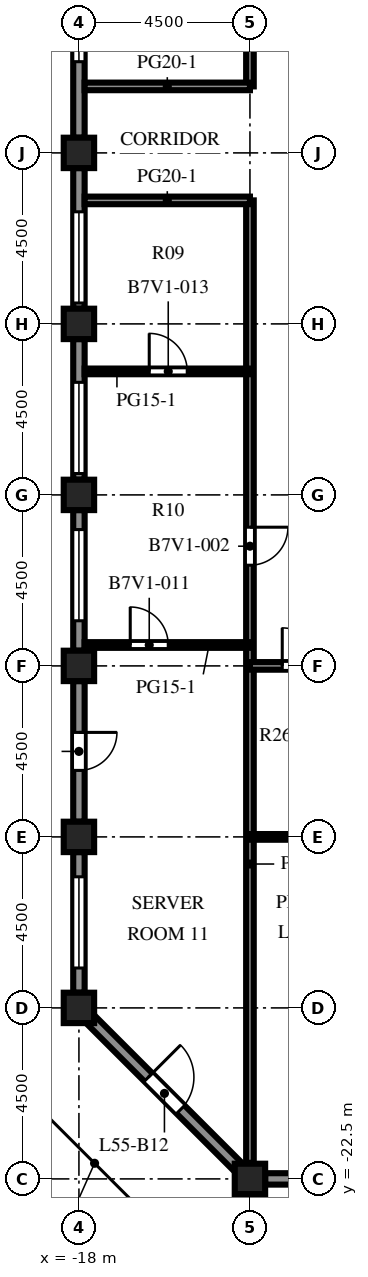
"""IFC4 building model, lengths in metres.
Left out: names, types, materials, properties, quantities, classifications, styles, units other than length and angle.
Written with IfcOpenShell. Run it as: python <this file> out.ifc"""

import sys

from ifc_helpers import new_model, si_unit, direction, frame, frame_2d, origin, origin_2d, place, context, subcontext, project, spatial, rectangle, extrude, element, fill, save


model = new_model("IFC4")
c1 = context("Model", 3, precision=1e-05, world=origin(), true_north=direction((0.0, 1.0)))
c2 = subcontext(c1, "Body", "Model", "MODEL_VIEW")
j1 = project(units=[si_unit("LENGTHUNIT", "METRE"), si_unit("PLANEANGLEUNIT", "RADIAN")], contexts=[c1])
p1 = place(None, origin())
s1 = spatial("IfcSite", under=j1, at=p1, CompositionType="ELEMENT")
p2 = place(p1, origin())
s2 = spatial("IfcBuilding", under=s1, at=p2, CompositionType="ELEMENT")
p3 = place(p2, frame((0.0, 0.0, 243.9)))
s3 = spatial("IfcBuildingStorey", under=s2, at=p3, CompositionType="ELEMENT", Elevation=243.9)
for number, where, z_axis, x_axis in (
    (1, (-18.0, -18.0, 0.0), (0.0, 0.0, 1.0), (1.0, 0.0, 0.0)),
    (2, (-18.0, -13.5, 0.0), (0.0, 0.0, 1.0), (1.0, 0.0, 0.0)),
    (3, (-18.0, -9.0, 0.0), (0.0, 0.0, 1.0), (1.0, 0.0, 0.0)),
    (4, (-18.0, -4.5, 0.0), (0.0, 0.0, 1.0), (1.0, 0.0, 0.0)),
    (5, (-18.0, 0.0, 0.0), (0.0, 0.0, 1.0), (1.0, 0.0, 0.0)),
    (6, (-18.0, 4.5, 0.0), (0.0, 0.0, 1.0), (1.0, 0.0, 0.0)),
    (7, (-13.5, -22.5, 0.0), (0.0, 0.0, 1.0), (1.0, 0.0, 0.0)),
):
    element("IfcColumn", number, at=place(p3, frame(where, z_axis=z_axis, x_axis=x_axis)), inside=s3, PredefinedType="COLUMN", context=c2, shape_type="SweptSolid", body=[
        extrude(rectangle(XDim=0.8, YDim=0.8, at=origin_2d()), origin(), (0.0, 0.0, 1.0), 4.1),
    ])
p4 = place(p3, frame((-9.4, -22.5, 0.0), z_axis=(0.0, 0.0, 1.0), x_axis=(-1.0, 0.0, 0.0)))
e8 = element("IfcWall", 8, at=p4, inside=s3, PredefinedType="SOLIDWALL", context=c2, shape_type="SweptSolid", body=[
    extrude(rectangle(XDim=3.7, YDim=0.3, at=frame_2d((1.85, 0.0))), origin(), (0.0, 0.0, 1.0), 2.85),
])
p5 = place(p4, frame((0.65, 0.0, 0.8)))
e9 = element("IfcOpeningElement", 9, at=p5, cuts=e8, PredefinedType="OPENING", context=c2, shape_type="SweptSolid", body=[
    extrude(rectangle(XDim=2.4, YDim=1.7, at=frame_2d((1.2, 0.85))), frame((0.0, 0.16, 0.0), z_axis=(0.0, -1.0, 0.0), x_axis=(1.0, 0.0, 0.0)), (0.0, 0.0, 1.0), 0.32),
])
p6 = place(p3, frame((-18.0, 4.9, 0.0), z_axis=(0.0, 0.0, 1.0), x_axis=(0.0, 1.0, 0.0)))
e10 = element("IfcWall", 10, at=p6, inside=s3, PredefinedType="SOLIDWALL", context=c2, shape_type="SweptSolid", body=[
    extrude(rectangle(XDim=3.7, YDim=0.3, at=frame_2d((1.85, 0.0))), origin(), (0.0, 0.0, 1.0), 2.85),
])
p7 = place(p6, frame((2.0, 0.0, 0.8)))
e11 = element("IfcOpeningElement", 11, at=p7, cuts=e10, PredefinedType="OPENING", context=c2, shape_type="SweptSolid", body=[
    extrude(rectangle(XDim=1.2, YDim=1.7, at=frame_2d((0.6, 0.85))), frame((0.0, 0.16, 0.0), z_axis=(0.0, -1.0, 0.0), x_axis=(1.0, 0.0, 0.0)), (0.0, 0.0, 1.0), 0.32),
])
p8 = place(p3, frame((-18.0, 0.4, 0.0), z_axis=(0.0, 0.0, 1.0), x_axis=(0.0, 1.0, 0.0)))
e12 = element("IfcWall", 12, at=p8, inside=s3, PredefinedType="SOLIDWALL", context=c2, shape_type="SweptSolid", body=[
    extrude(rectangle(XDim=3.7, YDim=0.3, at=frame_2d((1.85, 0.0))), origin(), (0.0, 0.0, 1.0), 2.85),
])
p9 = place(p8, frame((0.15, 0.0, 0.8)))
e13 = element("IfcOpeningElement", 13, at=p9, cuts=e12, PredefinedType="OPENING", context=c2, shape_type="SweptSolid", body=[
    extrude(rectangle(XDim=2.4, YDim=1.7, at=frame_2d((1.2, 0.85))), frame((0.0, 0.16, 0.0), z_axis=(0.0, -1.0, 0.0), x_axis=(1.0, 0.0, 0.0)), (0.0, 0.0, 1.0), 0.32),
])
p10 = place(p3, frame((-18.0, -4.1, 0.0), z_axis=(0.0, 0.0, 1.0), x_axis=(0.0, 1.0, 0.0)))
e14 = element("IfcWall", 14, at=p10, inside=s3, PredefinedType="SOLIDWALL", context=c2, shape_type="SweptSolid", body=[
    extrude(rectangle(XDim=3.7, YDim=0.3, at=frame_2d((1.85, 0.0))), origin(), (0.0, 0.0, 1.0), 2.85),
])
p11 = place(p10, frame((0.163, 0.0, 0.8)))
e15 = element("IfcOpeningElement", 15, at=p11, cuts=e14, PredefinedType="OPENING", context=c2, shape_type="SweptSolid", body=[
    extrude(rectangle(XDim=2.4, YDim=1.7, at=frame_2d((1.2, 0.85))), frame((0.0, 0.16, 0.0), z_axis=(0.0, -1.0, 0.0), x_axis=(1.0, 0.0, 0.0)), (0.0, 0.0, 1.0), 0.32),
])
p12 = place(p3, frame((-18.0, -8.6, 0.0), z_axis=(0.0, 0.0, 1.0), x_axis=(0.0, 1.0, 0.0)))
e16 = element("IfcWall", 16, at=p12, inside=s3, PredefinedType="SOLIDWALL", context=c2, shape_type="SweptSolid", body=[
    extrude(rectangle(XDim=3.7, YDim=0.3, at=frame_2d((1.85, 0.0))), origin(), (0.0, 0.0, 1.0), 2.85),
])
p13 = place(p12, frame((0.788, 0.0, 0.8)))
e17 = element("IfcOpeningElement", 17, at=p13, cuts=e16, PredefinedType="OPENING", context=c2, shape_type="SweptSolid", body=[
    extrude(rectangle(XDim=2.4, YDim=1.7, at=frame_2d((1.2, 0.85))), frame((0.0, 0.16, 0.0), z_axis=(0.0, -1.0, 0.0), x_axis=(1.0, 0.0, 0.0)), (0.0, 0.0, 1.0), 0.32),
])
p14 = place(p3, frame((-18.0, -13.1, 0.0), z_axis=(0.0, 0.0, 1.0), x_axis=(0.0, 1.0, 0.0)))
e18 = element("IfcWall", 18, at=p14, inside=s3, PredefinedType="SOLIDWALL", context=c2, shape_type="SweptSolid", body=[
    extrude(rectangle(XDim=3.7, YDim=0.3, at=frame_2d((1.85, 0.0))), origin(), (0.0, 0.0, 1.0), 2.85),
])
p15 = place(p14, frame((1.35, 0.0, 0.0)))
e19 = element("IfcOpeningElement", 19, at=p15, cuts=e18, PredefinedType="OPENING", context=c2, shape_type="SweptSolid", body=[
    extrude(rectangle(XDim=1.0, YDim=2.2, at=frame_2d((0.5, 1.1))), frame((0.0, 0.16, 0.0), z_axis=(0.0, -1.0, 0.0), x_axis=(1.0, 0.0, 0.0)), (0.0, 0.0, 1.0), 0.32),
])
p16 = place(p3, frame((-18.0, -17.6, 0.0), z_axis=(0.0, 0.0, 1.0), x_axis=(0.0, 1.0, 0.0)))
e20 = element("IfcWall", 20, at=p16, inside=s3, PredefinedType="SOLIDWALL", context=c2, shape_type="SweptSolid", body=[
    extrude(rectangle(XDim=3.7, YDim=0.3, at=frame_2d((1.85, 0.0))), origin(), (0.0, 0.0, 1.0), 2.85),
])
p17 = place(p16, frame((0.65, 0.0, 0.8)))
e21 = element("IfcOpeningElement", 21, at=p17, cuts=e20, PredefinedType="OPENING", context=c2, shape_type="SweptSolid", body=[
    extrude(rectangle(XDim=2.4, YDim=1.7, at=frame_2d((1.2, 0.85))), frame((0.0, 0.16, 0.0), z_axis=(0.0, -1.0, 0.0), x_axis=(1.0, 0.0, 0.0)), (0.0, 0.0, 1.0), 0.32),
])
p18 = place(p3, frame((-13.794, -22.206, 0.0), z_axis=(0.0, 0.0, 1.0), x_axis=(-0.707106781187, 0.707106781187, 0.0)))
e22 = element("IfcWall", 22, at=p18, inside=s3, PredefinedType="SOLIDWALL", context=c2, shape_type="SweptSolid", body=[
    extrude(rectangle(XDim=5.532, YDim=0.3, at=frame_2d((2.766, 0.0))), origin(), (0.0, 0.0, 1.0), 2.85),
])
p19 = place(p18, frame((2.166, 0.0, 0.0)))
e23 = element("IfcOpeningElement", 23, at=p19, cuts=e22, PredefinedType="OPENING", context=c2, shape_type="SweptSolid", body=[
    extrude(rectangle(XDim=1.2, YDim=2.2, at=frame_2d((0.6, 1.1))), frame((0.0, 0.16, 0.0), z_axis=(0.0, -1.0, 0.0), x_axis=(1.0, 0.0, 0.0)), (0.0, 0.0, 1.0), 0.32),
])
p20 = place(p3, frame((-13.5, -22.077, 0.0), z_axis=(0.0, 0.0, 1.0), x_axis=(0.0, 1.0, 0.0)))
e24 = element("IfcWall", 24, at=p20, inside=s3, PredefinedType="PARTITIONING", context=c2, shape_type="SweptSolid", body=[
    extrude(rectangle(XDim=25.327, YDim=0.2, at=frame_2d((12.664, 0.0))), origin(), (0.0, 0.0, 1.0), 3.65),
])
p21 = place(p20, frame((15.727, 0.0, 0.0)))
e25 = element("IfcOpeningElement", 25, at=p21, cuts=e24, PredefinedType="OPENING", context=c2, shape_type="SweptSolid", body=[
    extrude(rectangle(XDim=1.0, YDim=2.1, at=frame_2d((0.5, 1.05))), frame((0.0, 0.11, 0.0), z_axis=(0.0, -1.0, 0.0), x_axis=(1.0, 0.0, 0.0)), (0.0, 0.0, 1.0), 0.22),
])
p22 = place(p3, frame((-13.5, 6.25, 0.0), z_axis=(0.0, 0.0, 1.0), x_axis=(0.0, 1.0, 0.0)))
e26 = element("IfcWall", 26, at=p22, inside=s3, PredefinedType="PARTITIONING", context=c2, shape_type="SweptSolid", body=[
    extrude(rectangle(XDim=24.827, YDim=0.2, at=frame_2d((12.414, 0.0))), origin(), (0.0, 0.0, 1.0), 3.65),
])
p23 = place(p22, frame((8.35, 0.0, 0.0)))
e27 = element("IfcOpeningElement", 27, at=p23, cuts=e26, PredefinedType="OPENING", context=c2, shape_type="SweptSolid", body=[
    extrude(rectangle(XDim=1.0, YDim=2.1, at=frame_2d((0.5, 1.05))), frame((0.0, 0.11, 0.0), z_axis=(0.0, -1.0, 0.0), x_axis=(1.0, 0.0, 0.0)), (0.0, 0.0, 1.0), 0.22),
])
p24 = place(p3, frame((21.0, -13.5, 0.0), z_axis=(0.0, 0.0, 1.0), x_axis=(-1.0, 0.0, 0.0)))
e28 = element("IfcWall", 28, at=p24, inside=s3, PredefinedType="PARTITIONING", context=c2, shape_type="SweptSolid", body=[
    extrude(rectangle(XDim=34.5, YDim=0.15, at=frame_2d((17.25, 0.0))), origin(), (0.0, 0.0, 1.0), 3.65),
])
p25 = place(p24, frame((31.65, 0.0, 0.0)))
e29 = element("IfcOpeningElement", 29, at=p25, cuts=e28, PredefinedType="OPENING", context=c2, shape_type="SweptSolid", body=[
    extrude(rectangle(XDim=1.0, YDim=2.1, at=frame_2d((0.5, 1.05))), frame((0.0, 0.085, 0.0), z_axis=(0.0, -1.0, 0.0), x_axis=(1.0, 0.0, 0.0)), (0.0, 0.0, 1.0), 0.17),
])
p26 = place(p24, frame((22.15, 0.0, 0.0)))
e30 = element("IfcOpeningElement", 30, at=p26, cuts=e28, PredefinedType="OPENING", context=c2, shape_type="SweptSolid", body=[
    extrude(rectangle(XDim=1.0, YDim=2.1, at=frame_2d((0.5, 1.05))), frame((0.0, 0.085, 0.0), z_axis=(0.0, -1.0, 0.0), x_axis=(1.0, 0.0, 0.0)), (0.0, 0.0, 1.0), 0.17),
])
p27 = place(p24, frame((13.15, 0.0, 0.0)))
e31 = element("IfcOpeningElement", 31, at=p27, cuts=e28, PredefinedType="OPENING", context=c2, shape_type="SweptSolid", body=[
    extrude(rectangle(XDim=1.0, YDim=2.1, at=frame_2d((0.5, 1.05))), frame((0.0, 0.085, 0.0), z_axis=(0.0, -1.0, 0.0), x_axis=(1.0, 0.0, 0.0)), (0.0, 0.0, 1.0), 0.17),
])
p28 = place(p24, frame((6.15, 0.0, 0.0)))
e32 = element("IfcOpeningElement", 32, at=p28, cuts=e28, PredefinedType="OPENING", context=c2, shape_type="SweptSolid", body=[
    extrude(rectangle(XDim=1.0, YDim=2.1, at=frame_2d((0.5, 1.05))), frame((0.0, 0.085, 0.0), z_axis=(0.0, -1.0, 0.0), x_axis=(1.0, 0.0, 0.0)), (0.0, 0.0, 1.0), 0.17),
])
p29 = place(p3, frame((-10.5, -9.0, 0.0), z_axis=(0.0, 0.0, 1.0), x_axis=(-1.0, 0.0, 0.0)))
e33 = element("IfcWall", 33, at=p29, inside=s3, PredefinedType="PARTITIONING", context=c2, shape_type="SweptSolid", body=[
    extrude(rectangle(XDim=3.0, YDim=0.2, at=frame_2d((1.5, 0.0))), origin(), (0.0, 0.0, 1.0), 3.65),
])
p30 = place(p29, frame((1.15, 0.0, 0.0)))
e34 = element("IfcOpeningElement", 34, at=p30, cuts=e33, PredefinedType="OPENING", context=c2, shape_type="SweptSolid", body=[
    extrude(rectangle(XDim=1.0, YDim=2.1, at=frame_2d((0.5, 1.05))), frame((0.0, 0.11, 0.0), z_axis=(0.0, -1.0, 0.0), x_axis=(1.0, 0.0, 0.0)), (0.0, 0.0, 1.0), 0.22),
])
p31 = place(p3, frame((-13.5, -8.45, 0.0), z_axis=(0.0, 0.0, 1.0), x_axis=(-1.0, 0.0, 0.0)))
e35 = element("IfcWall", 35, at=p31, inside=s3, PredefinedType="PARTITIONING", context=c2, shape_type="SweptSolid", body=[
    extrude(rectangle(XDim=4.35, YDim=0.15, at=frame_2d((2.175, 0.0))), origin(), (0.0, 0.0, 1.0), 3.65),
])
p32 = place(p31, frame((2.15, 0.0, 0.0)))
e36 = element("IfcOpeningElement", 36, at=p32, cuts=e35, PredefinedType="OPENING", context=c2, shape_type="SweptSolid", body=[
    extrude(rectangle(XDim=1.0, YDim=2.1, at=frame_2d((0.5, 1.05))), frame((0.0, 0.085, 0.0), z_axis=(0.0, -1.0, 0.0), x_axis=(1.0, 0.0, 0.0)), (0.0, 0.0, 1.0), 0.17),
])
p33 = place(p3, frame((-17.85, -1.25, 0.0), z_axis=(0.0, 0.0, 1.0), x_axis=(1.0, 0.0, 0.0)))
e37 = element("IfcWall", 37, at=p33, inside=s3, PredefinedType="PARTITIONING", context=c2, shape_type="SweptSolid", body=[
    extrude(rectangle(XDim=4.35, YDim=0.15, at=frame_2d((2.175, 0.0))), origin(), (0.0, 0.0, 1.0), 3.65),
])
p34 = place(p33, frame((1.7, 0.0, 0.0)))
e38 = element("IfcOpeningElement", 38, at=p34, cuts=e37, PredefinedType="OPENING", context=c2, shape_type="SweptSolid", body=[
    extrude(rectangle(XDim=1.0, YDim=2.1, at=frame_2d((0.5, 1.05))), frame((0.0, 0.085, 0.0), z_axis=(0.0, -1.0, 0.0), x_axis=(1.0, 0.0, 0.0)), (0.0, 0.0, 1.0), 0.17),
])
for number, where, z_axis, x_axis in (
    (39, (-17.85, 3.25, 0.0), (0.0, 0.0, 1.0), (1.0, 0.0, 0.0)),
    (40, (-17.85, 6.25, 0.0), (0.0, 0.0, 1.0), (1.0, 0.0, 0.0)),
):
    element("IfcWall", number, at=place(p3, frame(where, z_axis=z_axis, x_axis=x_axis)), inside=s3, PredefinedType="PARTITIONING", context=c2, shape_type="SweptSolid", body=[
        extrude(rectangle(XDim=4.35, YDim=0.2, at=frame_2d((2.175, 0.0))), origin(), (0.0, 0.0, 1.0), 3.65),
    ])
p35 = place(p7, origin())
e41 = element("IfcWindow", 41, at=p35, inside=s3, PartitioningType="SINGLE_PANEL", PredefinedType="WINDOW", context=c2, shape_type="SweptSolid", body=[
    extrude(rectangle(XDim=1.2, YDim=1.7, at=frame_2d((0.6, 0.85))), frame((0.0, 0.03, 0.0), z_axis=(0.0, -1.0, 0.0), x_axis=(1.0, 0.0, 0.0)), (0.0, 0.0, 1.0), 0.06),
])
fill(e11, e41)
p36 = place(p9, origin())
e42 = element("IfcWindow", 42, at=p36, inside=s3, PartitioningType="SINGLE_PANEL", PredefinedType="WINDOW", context=c2, shape_type="SweptSolid", body=[
    extrude(rectangle(XDim=2.4, YDim=1.7, at=frame_2d((1.2, 0.85))), frame((0.0, 0.03, 0.0), z_axis=(0.0, -1.0, 0.0), x_axis=(1.0, 0.0, 0.0)), (0.0, 0.0, 1.0), 0.06),
])
fill(e13, e42)
p37 = place(p11, origin())
e43 = element("IfcWindow", 43, at=p37, inside=s3, PartitioningType="SINGLE_PANEL", PredefinedType="WINDOW", context=c2, shape_type="SweptSolid", body=[
    extrude(rectangle(XDim=2.4, YDim=1.7, at=frame_2d((1.2, 0.85))), frame((0.0, 0.03, 0.0), z_axis=(0.0, -1.0, 0.0), x_axis=(1.0, 0.0, 0.0)), (0.0, 0.0, 1.0), 0.06),
])
fill(e15, e43)
p38 = place(p13, origin())
e44 = element("IfcWindow", 44, at=p38, inside=s3, PartitioningType="SINGLE_PANEL", PredefinedType="WINDOW", context=c2, shape_type="SweptSolid", body=[
    extrude(rectangle(XDim=2.4, YDim=1.7, at=frame_2d((1.2, 0.85))), frame((0.0, 0.03, 0.0), z_axis=(0.0, -1.0, 0.0), x_axis=(1.0, 0.0, 0.0)), (0.0, 0.0, 1.0), 0.06),
])
fill(e17, e44)
p39 = place(p15, origin())
e45 = element("IfcDoor", 45, at=p39, inside=s3, OperationType="SINGLE_SWING_RIGHT", PredefinedType="DOOR", context=c2, shape_type="SweptSolid", body=[
    extrude(rectangle(XDim=1.0, YDim=2.2, at=frame_2d((0.5, 1.1))), frame((0.0, 0.025, 0.0), z_axis=(0.0, -1.0, 0.0), x_axis=(1.0, 0.0, 0.0)), (0.0, 0.0, 1.0), 0.05),
])
fill(e19, e45)
p40 = place(p17, origin())
e46 = element("IfcWindow", 46, at=p40, inside=s3, PartitioningType="SINGLE_PANEL", PredefinedType="WINDOW", context=c2, shape_type="SweptSolid", body=[
    extrude(rectangle(XDim=2.4, YDim=1.7, at=frame_2d((1.2, 0.85))), frame((0.0, 0.03, 0.0), z_axis=(0.0, -1.0, 0.0), x_axis=(1.0, 0.0, 0.0)), (0.0, 0.0, 1.0), 0.06),
])
fill(e21, e46)
p41 = place(p19, origin())
e47 = element("IfcDoor", 47, at=p41, inside=s3, OperationType="SINGLE_SWING_RIGHT", PredefinedType="DOOR", context=c2, shape_type="SweptSolid", body=[
    extrude(rectangle(XDim=1.2, YDim=2.2, at=frame_2d((0.6, 1.1))), frame((0.0, 0.025, 0.0), z_axis=(0.0, -1.0, 0.0), x_axis=(1.0, 0.0, 0.0)), (0.0, 0.0, 1.0), 0.05),
])
fill(e23, e47)
p42 = place(p21, origin())
e48 = element("IfcDoor", 48, at=p42, inside=s3, OperationType="SINGLE_SWING_RIGHT", PredefinedType="DOOR", context=c2, shape_type="SweptSolid", body=[
    extrude(rectangle(XDim=1.0, YDim=2.1, at=frame_2d((0.5, 1.05))), frame((0.0, 0.025, 0.0), z_axis=(0.0, -1.0, 0.0), x_axis=(1.0, 0.0, 0.0)), (0.0, 0.0, 1.0), 0.05),
])
fill(e25, e48)
p43 = place(p30, origin())
e49 = element("IfcDoor", 49, at=p43, inside=s3, OperationType="SINGLE_SWING_RIGHT", PredefinedType="DOOR", context=c2, shape_type="SweptSolid", body=[
    extrude(rectangle(XDim=1.0, YDim=2.1, at=frame_2d((0.5, 1.05))), frame((0.0, 0.025, 0.0), z_axis=(0.0, -1.0, 0.0), x_axis=(1.0, 0.0, 0.0)), (0.0, 0.0, 1.0), 0.05),
])
fill(e34, e49)
p44 = place(p32, origin())
e50 = element("IfcDoor", 50, at=p44, inside=s3, OperationType="SINGLE_SWING_RIGHT", PredefinedType="DOOR", context=c2, shape_type="SweptSolid", body=[
    extrude(rectangle(XDim=1.0, YDim=2.1, at=frame_2d((0.5, 1.05))), frame((0.0, 0.025, 0.0), z_axis=(0.0, -1.0, 0.0), x_axis=(1.0, 0.0, 0.0)), (0.0, 0.0, 1.0), 0.05),
])
fill(e36, e50)
p45 = place(p34, origin())
e51 = element("IfcDoor", 51, at=p45, inside=s3, OperationType="SINGLE_SWING_LEFT", PredefinedType="DOOR", context=c2, shape_type="SweptSolid", body=[
    extrude(rectangle(XDim=1.0, YDim=2.1, at=frame_2d((0.5, 1.05))), frame((0.0, 0.025, 0.0), z_axis=(0.0, -1.0, 0.0), x_axis=(1.0, 0.0, 0.0)), (0.0, 0.0, 1.0), 0.05),
])
fill(e38, e51)
save(model, sys.argv[1])
